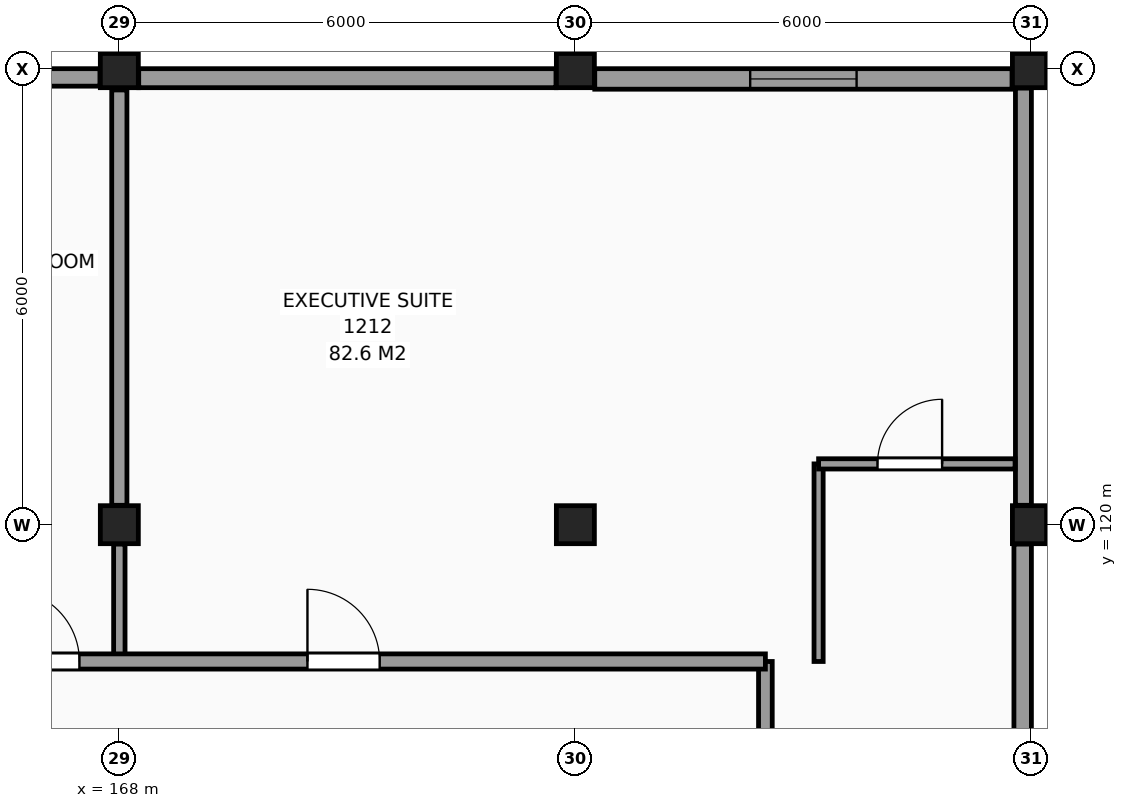
"""IFC4 building model, lengths in metres.
Left out: names, types, materials, properties, quantities, classifications, styles, units other than length and angle.
Written with IfcOpenShell. Run it as: python <this file> out.ifc"""

import sys

from ifc_helpers import new_model, si_unit, direction, frame, frame_2d, origin, origin_2d, place, context, subcontext, project, spatial, rectangle, extrude, element, fill, save


model = new_model("IFC4")
c1 = context("Model", 3, precision=1e-05, world=origin(), true_north=direction((0.0, 1.0)))
c2 = subcontext(c1, "Body", "Model", "MODEL_VIEW")
j1 = project(units=[si_unit("LENGTHUNIT", "METRE"), si_unit("PLANEANGLEUNIT", "RADIAN")], contexts=[c1])
p1 = place(None, origin())
s1 = spatial("IfcSite", under=j1, at=p1, CompositionType="ELEMENT")
p2 = place(p1, origin())
s2 = spatial("IfcBuilding", under=s1, at=p2, CompositionType="ELEMENT")
p3 = place(p2, frame((0.0, 0.0, 48.0)))
s3 = spatial("IfcBuildingStorey", under=s2, at=p3, CompositionType="ELEMENT", Elevation=48.0)
for number, where, z_axis, x_axis in (
    (1, (168.0, 120.0, 0.0), (0.0, 0.0, 1.0), (1.0, 0.0, 0.0)),
    (2, (168.0, 126.0, 0.0), (0.0, 0.0, 1.0), (1.0, 0.0, 0.0)),
    (3, (174.0, 120.0, 0.0), (0.0, 0.0, 1.0), (1.0, 0.0, 0.0)),
    (4, (174.0, 126.0, 0.0), (0.0, 0.0, 1.0), (1.0, 0.0, 0.0)),
    (5, (180.0, 120.0, 0.0), (0.0, 0.0, 1.0), (1.0, 0.0, 0.0)),
    (6, (180.0, 126.0, 0.0), (0.0, 0.0, 1.0), (1.0, 0.0, 0.0)),
):
    element("IfcColumn", number, at=place(p3, frame(where, z_axis=z_axis, x_axis=x_axis)), inside=s3, PredefinedType="COLUMN", context=c2, shape_type="SweptSolid", body=[
        extrude(rectangle(XDim=0.5, YDim=0.5, at=origin_2d()), origin(), (0.0, 0.0, 1.0), 3.3),
    ])
p4 = place(p3, frame((179.885, 114.255, 0.0), z_axis=(0.0, 0.0, 1.0), x_axis=(0.0, 1.0, 0.0)))
e7 = element("IfcWall", 7, at=p4, inside=s3, PredefinedType="SOLIDWALL", context=c2, shape_type="SweptSolid", body=[
    extrude(rectangle(XDim=5.49, YDim=0.23, at=frame_2d((2.745, 0.0))), origin(), (0.0, 0.0, 1.0), 2.4),
])
p5 = place(p3, frame((179.895, 120.255, 0.0), z_axis=(0.0, 0.0, 1.0), x_axis=(0.0, 1.0, 0.0)))
e8 = element("IfcWall", 8, at=p5, inside=s3, PredefinedType="SOLIDWALL", context=c2, shape_type="SweptSolid", body=[
    extrude(rectangle(XDim=5.49, YDim=0.21, at=frame_2d((2.745, 0.0))), origin(), (0.0, 0.0, 1.0), 2.4),
])
p6 = place(p3, frame((179.745, 125.865, 0.0), z_axis=(0.0, 0.0, 1.0), x_axis=(-1.0, 0.0, 0.0)))
e9 = element("IfcWall", 9, at=p6, inside=s3, PredefinedType="SOLIDWALL", context=c2, shape_type="SweptSolid", body=[
    extrude(rectangle(XDim=5.49, YDim=0.27, at=frame_2d((2.745, 0.0))), origin(), (0.0, 0.0, 1.0), 2.4),
])
p7 = place(p6, frame((2.045, 0.0, 0.8)))
e10 = element("IfcOpeningElement", 10, at=p7, cuts=e9, PredefinedType="OPENING", context=c2, shape_type="SweptSolid", body=[
    extrude(rectangle(XDim=1.4, YDim=1.4, at=frame_2d((0.7, 0.7))), frame((0.0, 0.145, 0.0), z_axis=(0.0, -1.0, 0.0), x_axis=(1.0, 0.0, 0.0)), (0.0, 0.0, 1.0), 0.29),
])
p8 = place(p3, frame((173.745, 125.875, 0.0), z_axis=(0.0, 0.0, 1.0), x_axis=(-1.0, 0.0, 0.0)))
e11 = element("IfcWall", 11, at=p8, inside=s3, PredefinedType="SOLIDWALL", context=c2, shape_type="SweptSolid", body=[
    extrude(rectangle(XDim=5.49, YDim=0.25, at=frame_2d((2.745, 0.0))), origin(), (0.0, 0.0, 1.0), 2.4),
])
p9 = place(p3, frame((167.745, 125.885, 0.0), z_axis=(0.0, 0.0, 1.0), x_axis=(-1.0, 0.0, 0.0)))
e12 = element("IfcWall", 12, at=p9, inside=s3, PredefinedType="SOLIDWALL", context=c2, shape_type="SweptSolid", body=[
    extrude(rectangle(XDim=5.49, YDim=0.23, at=frame_2d((2.745, 0.0))), origin(), (0.0, 0.0, 1.0), 2.4),
])
p10 = place(p9, frame((1.432, 0.0, 0.8)))
e13 = element("IfcOpeningElement", 13, at=p10, cuts=e12, PredefinedType="OPENING", context=c2, shape_type="SweptSolid", body=[
    extrude(rectangle(XDim=1.4, YDim=1.4, at=frame_2d((0.7, 0.7))), frame((0.0, 0.125, 0.0), z_axis=(0.0, -1.0, 0.0), x_axis=(1.0, 0.0, 0.0)), (0.0, 0.0, 1.0), 0.25),
])
p11 = place(p3, frame((168.0, 118.2, 0.0), z_axis=(0.0, 0.0, 1.0), x_axis=(0.0, 1.0, 0.0)))
e14 = element("IfcWall", 14, at=p11, inside=s3, PredefinedType="PARTITIONING", context=c2, shape_type="SweptSolid", body=[
    extrude(rectangle(XDim=1.545, YDim=0.15, at=frame_2d((0.772, 0.0))), origin(), (0.0, 0.0, 1.0), 2.5),
])
p12 = place(p3, frame((168.0, 120.255, 0.0), z_axis=(0.0, 0.0, 1.0), x_axis=(0.0, 1.0, 0.0)))
e15 = element("IfcWall", 15, at=p12, inside=s3, PredefinedType="PARTITIONING", context=c2, shape_type="SweptSolid", body=[
    extrude(rectangle(XDim=5.465, YDim=0.2, at=frame_2d((2.732, 0.0))), origin(), (0.0, 0.0, 1.0), 2.55),
])
p13 = place(p3, frame((176.5, 115.8, 0.0), z_axis=(0.0, 0.0, 1.0), x_axis=(0.0, 1.0, 0.0)))
e16 = element("IfcWall", 16, at=p13, inside=s3, PredefinedType="PARTITIONING", context=c2, shape_type="SweptSolid", body=[
    extrude(rectangle(XDim=2.4, YDim=0.18, at=frame_2d((1.2, 0.0))), origin(), (0.0, 0.0, 1.0), 3.05),
])
p14 = place(p3, frame((177.2, 118.2, 0.0), z_axis=(0.0, 0.0, 1.0), x_axis=(0.0, 1.0, 0.0)))
e17 = element("IfcWall", 17, at=p14, inside=s3, PredefinedType="PARTITIONING", context=c2, shape_type="SweptSolid", body=[
    extrude(rectangle(XDim=2.6, YDim=0.12, at=frame_2d((1.3, 0.0))), origin(), (0.0, 0.0, 1.0), 3.05),
])
p15 = place(p3, frame((102.235, 118.2, 0.0), z_axis=(0.0, 0.0, 1.0), x_axis=(1.0, 0.0, 0.0)))
e18 = element("IfcWall", 18, at=p15, inside=s3, PredefinedType="PARTITIONING", context=c2, shape_type="SweptSolid", body=[
    extrude(rectangle(XDim=74.265, YDim=0.2, at=frame_2d((37.132, 0.0))), origin(), (0.0, 0.0, 1.0), 3.05),
])
p16 = place(p15, frame((0.49, 0.0, 0.0)))
e19 = element("IfcOpeningElement", 19, at=p16, cuts=e18, PredefinedType="OPENING", context=c2, shape_type="SweptSolid", body=[
    extrude(rectangle(XDim=0.95, YDim=2.1, at=frame_2d((0.475, 1.05))), frame((0.0, 0.11, 0.0), z_axis=(0.0, -1.0, 0.0), x_axis=(1.0, 0.0, 0.0)), (0.0, 0.0, 1.0), 0.22),
])
p17 = place(p15, frame((4.89, 0.0, 0.0)))
e20 = element("IfcOpeningElement", 20, at=p17, cuts=e18, PredefinedType="OPENING", context=c2, shape_type="SweptSolid", body=[
    extrude(rectangle(XDim=0.95, YDim=2.1, at=frame_2d((0.475, 1.05))), frame((0.0, 0.11, 0.0), z_axis=(0.0, -1.0, 0.0), x_axis=(1.0, 0.0, 0.0)), (0.0, 0.0, 1.0), 0.22),
])
p18 = place(p15, frame((12.09, 0.0, 0.0)))
e21 = element("IfcOpeningElement", 21, at=p18, cuts=e18, PredefinedType="OPENING", context=c2, shape_type="SweptSolid", body=[
    extrude(rectangle(XDim=0.95, YDim=2.1, at=frame_2d((0.475, 1.05))), frame((0.0, 0.11, 0.0), z_axis=(0.0, -1.0, 0.0), x_axis=(1.0, 0.0, 0.0)), (0.0, 0.0, 1.0), 0.22),
])
p19 = place(p15, frame((20.34, 0.0, 0.0)))
e22 = element("IfcOpeningElement", 22, at=p19, cuts=e18, PredefinedType="OPENING", context=c2, shape_type="SweptSolid", body=[
    extrude(rectangle(XDim=0.95, YDim=2.1, at=frame_2d((0.475, 1.05))), frame((0.0, 0.11, 0.0), z_axis=(0.0, -1.0, 0.0), x_axis=(1.0, 0.0, 0.0)), (0.0, 0.0, 1.0), 0.22),
])
p20 = place(p15, frame((32.34, 0.0, 0.0)))
e23 = element("IfcOpeningElement", 23, at=p20, cuts=e18, PredefinedType="OPENING", context=c2, shape_type="SweptSolid", body=[
    extrude(rectangle(XDim=0.95, YDim=2.1, at=frame_2d((0.475, 1.05))), frame((0.0, 0.11, 0.0), z_axis=(0.0, -1.0, 0.0), x_axis=(1.0, 0.0, 0.0)), (0.0, 0.0, 1.0), 0.22),
])
p21 = place(p15, frame((34.89, 0.0, 0.0)))
e24 = element("IfcOpeningElement", 24, at=p21, cuts=e18, PredefinedType="OPENING", context=c2, shape_type="SweptSolid", body=[
    extrude(rectangle(XDim=0.95, YDim=2.1, at=frame_2d((0.475, 1.05))), frame((0.0, 0.11, 0.0), z_axis=(0.0, -1.0, 0.0), x_axis=(1.0, 0.0, 0.0)), (0.0, 0.0, 1.0), 0.22),
])
p22 = place(p15, frame((42.09, 0.0, 0.0)))
e25 = element("IfcOpeningElement", 25, at=p22, cuts=e18, PredefinedType="OPENING", context=c2, shape_type="SweptSolid", body=[
    extrude(rectangle(XDim=0.95, YDim=2.1, at=frame_2d((0.475, 1.05))), frame((0.0, 0.11, 0.0), z_axis=(0.0, -1.0, 0.0), x_axis=(1.0, 0.0, 0.0)), (0.0, 0.0, 1.0), 0.22),
])
p23 = place(p15, frame((46.29, 0.0, 0.0)))
e26 = element("IfcOpeningElement", 26, at=p23, cuts=e18, PredefinedType="OPENING", context=c2, shape_type="SweptSolid", body=[
    extrude(rectangle(XDim=0.95, YDim=2.1, at=frame_2d((0.475, 1.05))), frame((0.0, 0.11, 0.0), z_axis=(0.0, -1.0, 0.0), x_axis=(1.0, 0.0, 0.0)), (0.0, 0.0, 1.0), 0.22),
])
p24 = place(p15, frame((55.59, 0.0, 0.0)))
e27 = element("IfcOpeningElement", 27, at=p24, cuts=e18, PredefinedType="OPENING", context=c2, shape_type="SweptSolid", body=[
    extrude(rectangle(XDim=0.95, YDim=2.1, at=frame_2d((0.475, 1.05))), frame((0.0, 0.11, 0.0), z_axis=(0.0, -1.0, 0.0), x_axis=(1.0, 0.0, 0.0)), (0.0, 0.0, 1.0), 0.22),
])
p25 = place(p15, frame((60.09, 0.0, 0.0)))
e28 = element("IfcOpeningElement", 28, at=p25, cuts=e18, PredefinedType="OPENING", context=c2, shape_type="SweptSolid", body=[
    extrude(rectangle(XDim=0.95, YDim=2.1, at=frame_2d((0.475, 1.05))), frame((0.0, 0.11, 0.0), z_axis=(0.0, -1.0, 0.0), x_axis=(1.0, 0.0, 0.0)), (0.0, 0.0, 1.0), 0.22),
])
p26 = place(p15, frame((64.29, 0.0, 0.0)))
e29 = element("IfcOpeningElement", 29, at=p26, cuts=e18, PredefinedType="OPENING", context=c2, shape_type="SweptSolid", body=[
    extrude(rectangle(XDim=0.95, YDim=2.1, at=frame_2d((0.475, 1.05))), frame((0.0, 0.11, 0.0), z_axis=(0.0, -1.0, 0.0), x_axis=(1.0, 0.0, 0.0)), (0.0, 0.0, 1.0), 0.22),
])
p27 = place(p15, frame((68.24, 0.0, 0.0)))
e30 = element("IfcOpeningElement", 30, at=p27, cuts=e18, PredefinedType="OPENING", context=c2, shape_type="SweptSolid", body=[
    extrude(rectangle(XDim=0.95, YDim=2.1, at=frame_2d((0.475, 1.05))), frame((0.0, 0.11, 0.0), z_axis=(0.0, -1.0, 0.0), x_axis=(1.0, 0.0, 0.0)), (0.0, 0.0, 1.0), 0.22),
])
p28 = place(p3, frame((177.2, 120.8, 0.0), z_axis=(0.0, 0.0, 1.0), x_axis=(1.0, 0.0, 0.0)))
e31 = element("IfcWall", 31, at=p28, inside=s3, PredefinedType="PARTITIONING", context=c2, shape_type="SweptSolid", body=[
    extrude(rectangle(XDim=2.585, YDim=0.135, at=frame_2d((1.292, 0.0))), origin(), (0.0, 0.0, 1.0), 3.05),
])
p29 = place(p28, frame((0.775, 0.0, 0.0)))
e32 = element("IfcOpeningElement", 32, at=p29, cuts=e31, PredefinedType="OPENING", context=c2, shape_type="SweptSolid", body=[
    extrude(rectangle(XDim=0.85, YDim=2.1, at=frame_2d((0.425, 1.05))), frame((0.0, 0.078, 0.0), z_axis=(0.0, -1.0, 0.0), x_axis=(1.0, 0.0, 0.0)), (0.0, 0.0, 1.0), 0.155),
])
p30 = place(p7, origin())
e33 = element("IfcWindow", 33, at=p30, inside=s3, PartitioningType="SINGLE_PANEL", PredefinedType="WINDOW", context=c2, shape_type="SweptSolid", body=[
    extrude(rectangle(XDim=1.4, YDim=1.4, at=frame_2d((0.7, 0.7))), frame((0.0, 0.03, 0.0), z_axis=(0.0, -1.0, 0.0), x_axis=(1.0, 0.0, 0.0)), (0.0, 0.0, 1.0), 0.06),
])
fill(e10, e33)
p31 = place(p26, origin())
e34 = element("IfcDoor", 34, at=p31, inside=s3, OperationType="SINGLE_SWING_LEFT", PredefinedType="DOOR", context=c2, shape_type="SweptSolid", body=[
    extrude(rectangle(XDim=0.95, YDim=2.1, at=frame_2d((0.475, 1.05))), frame((0.0, 0.025, 0.0), z_axis=(0.0, -1.0, 0.0), x_axis=(1.0, 0.0, 0.0)), (0.0, 0.0, 1.0), 0.05),
])
fill(e29, e34)
p32 = place(p29, origin())
e35 = element("IfcDoor", 35, at=p32, inside=s3, OperationType="SINGLE_SWING_RIGHT", PredefinedType="DOOR", context=c2, shape_type="SweptSolid", body=[
    extrude(rectangle(XDim=0.85, YDim=2.1, at=frame_2d((0.425, 1.05))), frame((0.0, 0.025, 0.0), z_axis=(0.0, -1.0, 0.0), x_axis=(1.0, 0.0, 0.0)), (0.0, 0.0, 1.0), 0.05),
])
fill(e32, e35)
p33 = place(p27, origin())
e36 = element("IfcDoor", 36, at=p33, inside=s3, OperationType="SINGLE_SWING_LEFT", PredefinedType="DOOR", context=c2, shape_type="SweptSolid", body=[
    extrude(rectangle(XDim=0.95, YDim=2.1, at=frame_2d((0.475, 1.05))), frame((0.0, 0.025, 0.0), z_axis=(0.0, -1.0, 0.0), x_axis=(1.0, 0.0, 0.0)), (0.0, 0.0, 1.0), 0.05),
])
fill(e30, e36)
save(model, sys.argv[1])
